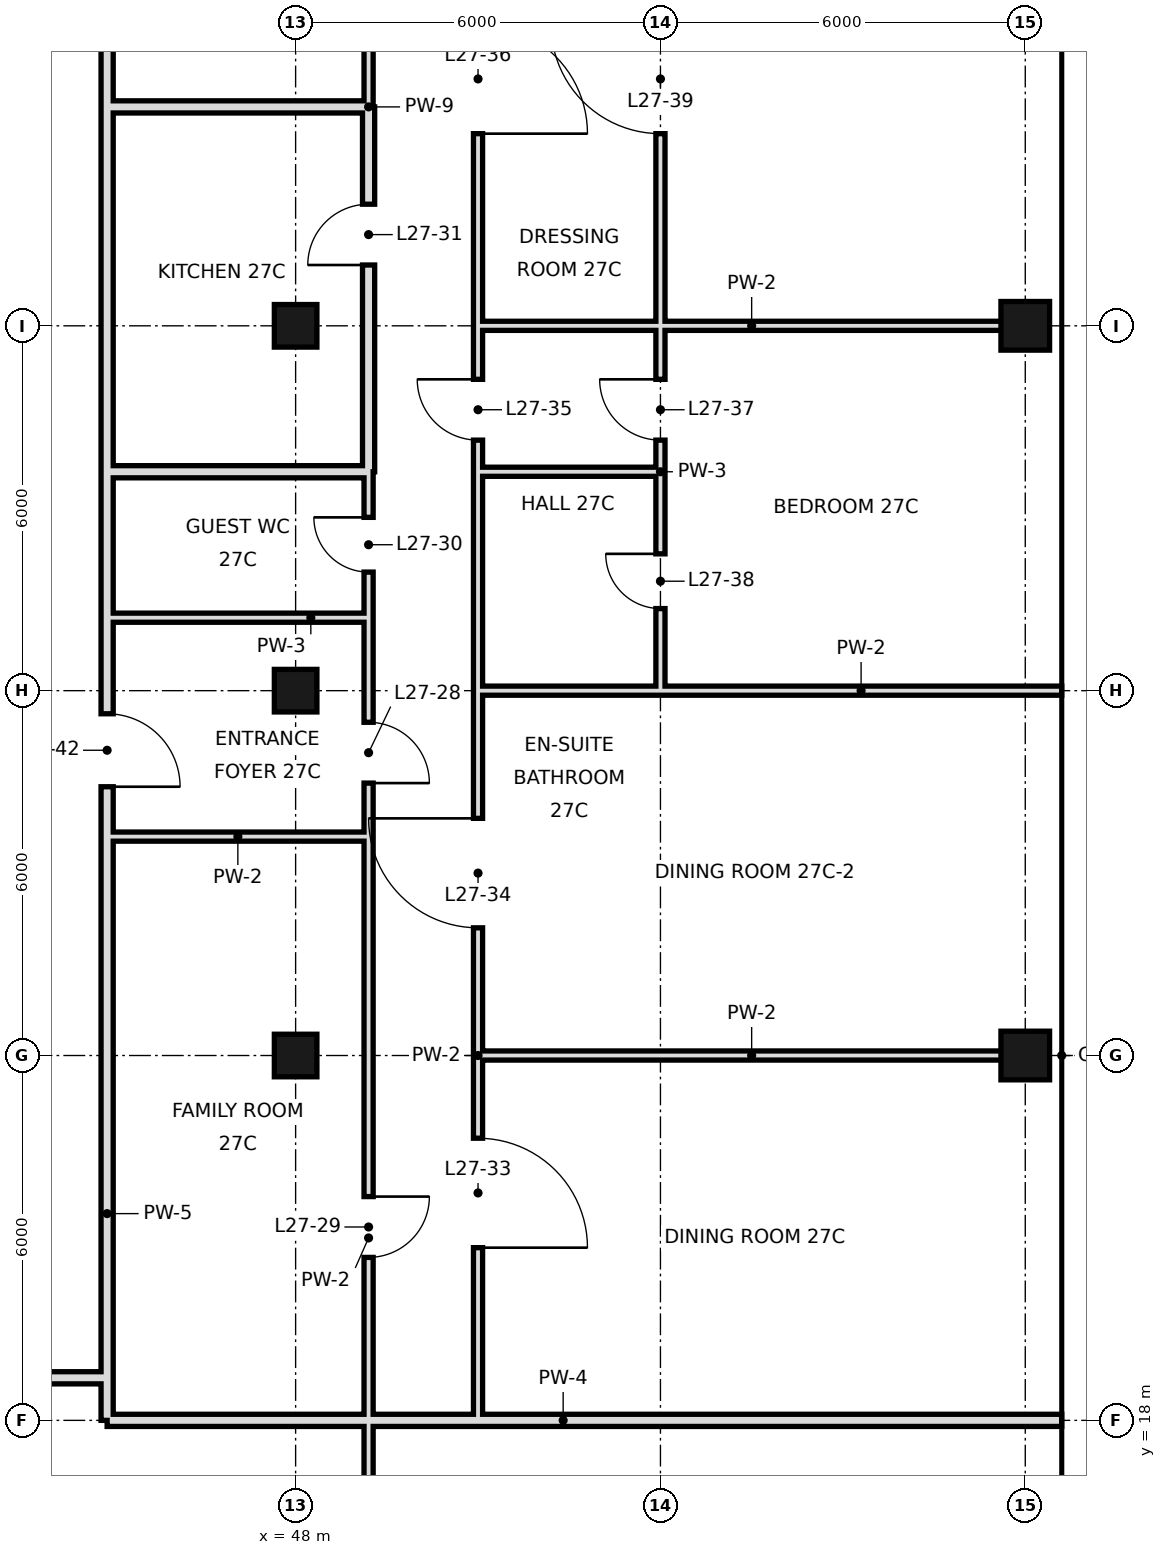
"""IFC4 building model, lengths in metres.
Left out: names, types, materials, properties, quantities, classifications, styles, units other than length and angle.
Written with IfcOpenShell. Run it as: python <this file> out.ifc"""

import sys

from ifc_helpers import new_model, si_unit, direction, frame, frame_2d, origin, origin_2d, place, context, subcontext, project, spatial, rectangle, hollow_rectangle, extrude, element, fill, save


model = new_model("IFC4")
c1 = context("Model", 3, precision=1e-05, world=origin(), true_north=direction((0.0, 1.0)))
c2 = subcontext(c1, "Body", "Model", "MODEL_VIEW")
j1 = project(units=[si_unit("LENGTHUNIT", "METRE"), si_unit("PLANEANGLEUNIT", "RADIAN")], contexts=[c1])
p1 = place(None, origin())
s1 = spatial("IfcSite", under=j1, at=p1, CompositionType="ELEMENT")
p2 = place(p1, origin())
s2 = spatial("IfcBuilding", under=s1, at=p2, CompositionType="ELEMENT")
p3 = place(p2, frame((0.0, 0.0, 123.2)))
s3 = spatial("IfcBuildingStorey", under=s2, at=p3, CompositionType="ELEMENT", Elevation=123.2)
for number, where, z_axis, x_axis in (
    (1, (48.0, 24.0, 0.0), (0.0, 0.0, 1.0), (1.0, 0.0, 0.0)),
    (2, (48.0, 30.0, 0.0), (0.0, 0.0, 1.0), (1.0, 0.0, 0.0)),
    (3, (48.0, 36.0, 0.0), (0.0, 0.0, 1.0), (1.0, 0.0, 0.0)),
):
    element("IfcColumn", number, at=place(p3, frame(where, z_axis=z_axis, x_axis=x_axis)), inside=s3, PredefinedType="COLUMN", context=c2, shape_type="SweptSolid", body=[
        extrude(hollow_rectangle(XDim=0.7, YDim=0.7, WallThickness=0.036, at=origin_2d()), origin(), (0.0, 0.0, 1.0), 3.6),
    ])
for number, where, z_axis, x_axis in (
    (4, (60.0, 24.0, 0.0), (0.0, 0.0, 1.0), (1.0, 0.0, 0.0)),
    (5, (60.0, 36.0, 0.0), (0.0, 0.0, 1.0), (1.0, 0.0, 0.0)),
):
    element("IfcColumn", number, at=place(p3, frame(where, z_axis=z_axis, x_axis=x_axis)), inside=s3, PredefinedType="COLUMN", context=c2, shape_type="SweptSolid", body=[
        extrude(hollow_rectangle(XDim=0.8, YDim=0.8, WallThickness=0.04, at=origin_2d()), origin(), (0.0, 0.0, 1.0), 3.6),
    ])
p4 = place(p3, frame((44.9, 18.7, 0.0), z_axis=(0.0, 0.0, 1.0), x_axis=(0.0, 1.0, 0.0)))
e6 = element("IfcWall", 6, at=p4, inside=s3, PredefinedType="SOLIDWALL", context=c2, shape_type="SweptSolid", body=[
    extrude(rectangle(XDim=14.9, YDim=0.2, at=frame_2d((7.45, 0.0))), origin(), (0.0, 0.0, 1.0), 2.97),
])
p5 = place(p4, frame((9.72, 0.0, 0.0)))
e7 = element("IfcOpeningElement", 7, at=p5, cuts=e6, PredefinedType="OPENING", context=c2, shape_type="SweptSolid", body=[
    extrude(rectangle(XDim=1.2, YDim=2.4, at=frame_2d((0.6, 1.2))), frame((0.0, 0.11, 0.0), z_axis=(0.0, -1.0, 0.0), x_axis=(1.0, 0.0, 0.0)), (0.0, 0.0, 1.0), 0.22),
])
p6 = place(p3, frame((44.9, 39.6, 0.0), z_axis=(0.0, 0.0, 1.0), x_axis=(0.0, 1.0, 0.0)))
e8 = element("IfcWall", 8, at=p6, inside=s3, PredefinedType="SOLIDWALL", context=c2, shape_type="SweptSolid", body=[
    extrude(rectangle(XDim=9.0, YDim=0.2, at=frame_2d((4.5, 0.0))), origin(), (0.0, 0.0, 1.0), 2.72),
])
p7 = place(p3, frame((44.9, 33.6, 0.0), z_axis=(0.0, 0.0, 1.0), x_axis=(0.0, 1.0, 0.0)))
e9 = element("IfcWall", 9, at=p7, inside=s3, PredefinedType="SOLIDWALL", context=c2, shape_type="SweptSolid", body=[
    extrude(rectangle(XDim=6.0, YDim=0.2, at=frame_2d((3.0, 0.0))), origin(), (0.0, 0.0, 1.0), 3.42),
])
p8 = place(p3, frame((44.9, 18.0, 0.0), z_axis=(0.0, 0.0, 1.0), x_axis=(0.0, 1.0, 0.0)))
e10 = element("IfcWall", 10, at=p8, inside=s3, PredefinedType="SOLIDWALL", context=c2, shape_type="SweptSolid", body=[
    extrude(rectangle(XDim=0.7, YDim=0.2, at=frame_2d((0.35, 0.0))), origin(), (0.0, 0.0, 1.0), 2.97),
])
p9 = place(p3, frame((49.2, 33.6, 0.0), z_axis=(0.0, 0.0, 1.0), x_axis=(0.0, 1.0, 0.0)))
e11 = element("IfcWall", 11, at=p9, inside=s3, PredefinedType="SOLIDWALL", context=c2, shape_type="SweptSolid", body=[
    extrude(rectangle(XDim=6.0, YDim=0.2, at=frame_2d((3.0, 0.0))), origin(), (0.0, 0.0, 1.0), 2.72),
])
p10 = place(p9, frame((3.4, 0.0, 0.0)))
e12 = element("IfcOpeningElement", 12, at=p10, cuts=e11, PredefinedType="OPENING", context=c2, shape_type="SweptSolid", body=[
    extrude(rectangle(XDim=1.0, YDim=2.4, at=frame_2d((0.5, 1.2))), frame((0.0, 0.11, 0.0), z_axis=(0.0, -1.0, 0.0), x_axis=(1.0, 0.0, 0.0)), (0.0, 0.0, 1.0), 0.22),
])
p11 = place(p3, frame((49.2, 10.8, 0.0), z_axis=(0.0, 0.0, 1.0), x_axis=(0.0, 1.0, 0.0)))
e13 = element("IfcWall", 13, at=p11, inside=s3, PredefinedType="PARTITIONING", context=c2, shape_type="SweptSolid", body=[
    extrude(rectangle(XDim=20.4, YDim=0.15, at=frame_2d((10.2, 0.0))), origin(), (0.0, 0.0, 1.0), 3.42),
])
p12 = place(p11, frame((17.68, 0.0, 0.0)))
e14 = element("IfcOpeningElement", 14, at=p12, cuts=e13, PredefinedType="OPENING", context=c2, shape_type="SweptSolid", body=[
    extrude(rectangle(XDim=1.0, YDim=2.4, at=frame_2d((0.5, 1.2))), frame((0.0, 0.085, 0.0), z_axis=(0.0, -1.0, 0.0), x_axis=(1.0, 0.0, 0.0)), (0.0, 0.0, 1.0), 0.17),
])
p13 = place(p11, frame((9.88, 0.0, 0.0)))
e15 = element("IfcOpeningElement", 15, at=p13, cuts=e13, PredefinedType="OPENING", context=c2, shape_type="SweptSolid", body=[
    extrude(rectangle(XDim=1.0, YDim=2.4, at=frame_2d((0.5, 1.2))), frame((0.0, 0.085, 0.0), z_axis=(0.0, -1.0, 0.0), x_axis=(1.0, 0.0, 0.0)), (0.0, 0.0, 1.0), 0.17),
])
p14 = place(p3, frame((49.2, 39.6, 0.0), z_axis=(0.0, 0.0, 1.0), x_axis=(0.0, 1.0, 0.0)))
e16 = element("IfcWall", 16, at=p14, inside=s3, PredefinedType="PARTITIONING", context=c2, shape_type="SweptSolid", body=[
    extrude(rectangle(XDim=9.0, YDim=0.15, at=frame_2d((4.5, 0.0))), origin(), (0.0, 0.0, 1.0), 3.42),
])
p15 = place(p14, frame((3.7, 0.0, 0.0)))
e17 = element("IfcOpeningElement", 17, at=p15, cuts=e16, PredefinedType="OPENING", context=c2, shape_type="SweptSolid", body=[
    extrude(rectangle(XDim=1.0, YDim=2.4, at=frame_2d((0.5, 1.2))), frame((0.0, 0.085, 0.0), z_axis=(0.0, -1.0, 0.0), x_axis=(1.0, 0.0, 0.0)), (0.0, 0.0, 1.0), 0.17),
])
p16 = place(p3, frame((49.2, 31.2, 0.0), z_axis=(0.0, 0.0, 1.0), x_axis=(0.0, 1.0, 0.0)))
e18 = element("IfcWall", 18, at=p16, inside=s3, PredefinedType="PARTITIONING", context=c2, shape_type="SweptSolid", body=[
    extrude(rectangle(XDim=2.4, YDim=0.15, at=frame_2d((1.2, 0.0))), origin(), (0.0, 0.0, 1.0), 3.42),
])
p17 = place(p16, frame((0.75, 0.0, 0.0)))
e19 = element("IfcOpeningElement", 19, at=p17, cuts=e18, PredefinedType="OPENING", context=c2, shape_type="SweptSolid", body=[
    extrude(rectangle(XDim=0.9, YDim=2.4, at=frame_2d((0.45, 1.2))), frame((0.0, 0.085, 0.0), z_axis=(0.0, -1.0, 0.0), x_axis=(1.0, 0.0, 0.0)), (0.0, 0.0, 1.0), 0.17),
])
p18 = place(p3, frame((51.0, 18.0, 0.0), z_axis=(0.0, 0.0, 1.0), x_axis=(0.0, 1.0, 0.0)))
e20 = element("IfcWall", 20, at=p18, inside=s3, PredefinedType="PARTITIONING", context=c2, shape_type="SweptSolid", body=[
    extrude(rectangle(XDim=12.0, YDim=0.15, at=frame_2d((6.0, 0.0))), origin(), (0.0, 0.0, 1.0), 3.42),
])
p19 = place(p18, frame((2.84, 0.0, 0.0)))
e21 = element("IfcOpeningElement", 21, at=p19, cuts=e20, PredefinedType="OPENING", context=c2, shape_type="SweptSolid", body=[
    extrude(rectangle(XDim=1.8, YDim=2.4, at=frame_2d((0.9, 1.2))), frame((0.0, 0.085, 0.0), z_axis=(0.0, -1.0, 0.0), x_axis=(1.0, 0.0, 0.0)), (0.0, 0.0, 1.0), 0.17),
])
p20 = place(p18, frame((8.1, 0.0, 0.0)))
e22 = element("IfcOpeningElement", 22, at=p20, cuts=e20, PredefinedType="OPENING", context=c2, shape_type="SweptSolid", body=[
    extrude(rectangle(XDim=1.8, YDim=2.4, at=frame_2d((0.9, 1.2))), frame((0.0, 0.085, 0.0), z_axis=(0.0, -1.0, 0.0), x_axis=(1.0, 0.0, 0.0)), (0.0, 0.0, 1.0), 0.17),
])
p21 = place(p3, frame((51.0, 33.6, 0.0), z_axis=(0.0, 0.0, 1.0), x_axis=(0.0, 1.0, 0.0)))
e23 = element("IfcWall", 23, at=p21, inside=s3, PredefinedType="PARTITIONING", context=c2, shape_type="SweptSolid", body=[
    extrude(rectangle(XDim=15.0, YDim=0.15, at=frame_2d((7.5, 0.0))), origin(), (0.0, 0.0, 1.0), 3.42),
])
p22 = place(p21, frame((0.52, 0.0, 0.0)))
e24 = element("IfcOpeningElement", 24, at=p22, cuts=e23, PredefinedType="OPENING", context=c2, shape_type="SweptSolid", body=[
    extrude(rectangle(XDim=1.0, YDim=2.4, at=frame_2d((0.5, 1.2))), frame((0.0, 0.085, 0.0), z_axis=(0.0, -1.0, 0.0), x_axis=(1.0, 0.0, 0.0)), (0.0, 0.0, 1.0), 0.17),
])
p23 = place(p21, frame((5.56, 0.0, 0.0)))
e25 = element("IfcOpeningElement", 25, at=p23, cuts=e23, PredefinedType="OPENING", context=c2, shape_type="SweptSolid", body=[
    extrude(rectangle(XDim=1.8, YDim=2.4, at=frame_2d((0.9, 1.2))), frame((0.0, 0.085, 0.0), z_axis=(0.0, -1.0, 0.0), x_axis=(1.0, 0.0, 0.0)), (0.0, 0.0, 1.0), 0.17),
])
p24 = place(p3, frame((51.0, 30.0, 0.0), z_axis=(0.0, 0.0, 1.0), x_axis=(0.0, 1.0, 0.0)))
e26 = element("IfcWall", 26, at=p24, inside=s3, PredefinedType="PARTITIONING", context=c2, shape_type="SweptSolid", body=[
    extrude(rectangle(XDim=3.6, YDim=0.15, at=frame_2d((1.8, 0.0))), origin(), (0.0, 0.0, 1.0), 3.42),
])
p25 = place(p3, frame((54.0, 33.6, 0.0), z_axis=(0.0, 0.0, 1.0), x_axis=(0.0, 1.0, 0.0)))
e27 = element("IfcWall", 27, at=p25, inside=s3, PredefinedType="PARTITIONING", context=c2, shape_type="SweptSolid", body=[
    extrude(rectangle(XDim=14.4, YDim=0.15, at=frame_2d((7.2, 0.0))), origin(), (0.0, 0.0, 1.0), 3.42),
])
p26 = place(p25, frame((0.52, 0.0, 0.0)))
e28 = element("IfcOpeningElement", 28, at=p26, cuts=e27, PredefinedType="OPENING", context=c2, shape_type="SweptSolid", body=[
    extrude(rectangle(XDim=1.0, YDim=2.4, at=frame_2d((0.5, 1.2))), frame((0.0, 0.085, 0.0), z_axis=(0.0, -1.0, 0.0), x_axis=(1.0, 0.0, 0.0)), (0.0, 0.0, 1.0), 0.17),
])
p27 = place(p25, frame((5.56, 0.0, 0.0)))
e29 = element("IfcOpeningElement", 29, at=p27, cuts=e27, PredefinedType="OPENING", context=c2, shape_type="SweptSolid", body=[
    extrude(rectangle(XDim=1.8, YDim=2.4, at=frame_2d((0.9, 1.2))), frame((0.0, 0.085, 0.0), z_axis=(0.0, -1.0, 0.0), x_axis=(1.0, 0.0, 0.0)), (0.0, 0.0, 1.0), 0.17),
])
p28 = place(p3, frame((54.0, 30.0, 0.0), z_axis=(0.0, 0.0, 1.0), x_axis=(0.0, 1.0, 0.0)))
e30 = element("IfcWall", 30, at=p28, inside=s3, PredefinedType="PARTITIONING", context=c2, shape_type="SweptSolid", body=[
    extrude(rectangle(XDim=3.6, YDim=0.15, at=frame_2d((1.8, 0.0))), origin(), (0.0, 0.0, 1.0), 3.42),
])
p29 = place(p28, frame((1.35, 0.0, 0.0)))
e31 = element("IfcOpeningElement", 31, at=p29, cuts=e30, PredefinedType="OPENING", context=c2, shape_type="SweptSolid", body=[
    extrude(rectangle(XDim=0.9, YDim=2.4, at=frame_2d((0.45, 1.2))), frame((0.0, 0.085, 0.0), z_axis=(0.0, -1.0, 0.0), x_axis=(1.0, 0.0, 0.0)), (0.0, 0.0, 1.0), 0.17),
])
p30 = place(p3, frame((44.9, 18.0, 0.0), z_axis=(0.0, 0.0, 1.0), x_axis=(1.0, 0.0, 0.0)))
e32 = element("IfcWall", 32, at=p30, inside=s3, PredefinedType="SOLIDWALL", context=c2, shape_type="SweptSolid", body=[
    extrude(rectangle(XDim=15.7, YDim=0.2, at=frame_2d((7.85, 0.0))), origin(), (0.0, 0.0, 1.0), 2.72),
])
p31 = place(p3, frame((35.4, 18.7, 0.0), z_axis=(0.0, 0.0, 1.0), x_axis=(1.0, 0.0, 0.0)))
e33 = element("IfcWall", 33, at=p31, inside=s3, PredefinedType="SOLIDWALL", context=c2, shape_type="SweptSolid", body=[
    extrude(rectangle(XDim=9.5, YDim=0.2, at=frame_2d((4.75, 0.0))), origin(), (0.0, 0.0, 1.0), 2.72),
])
p32 = place(p3, frame((51.0, 24.0, 0.0), z_axis=(0.0, 0.0, 1.0), x_axis=(1.0, 0.0, 0.0)))
e34 = element("IfcWall", 34, at=p32, inside=s3, PredefinedType="PARTITIONING", context=c2, shape_type="SweptSolid", body=[
    extrude(rectangle(XDim=9.0, YDim=0.15, at=frame_2d((4.5, 0.0))), origin(), (0.0, 0.0, 1.0), 2.72),
])
p33 = place(p3, frame((44.9, 27.6, 0.0), z_axis=(0.0, 0.0, 1.0), x_axis=(1.0, 0.0, 0.0)))
e35 = element("IfcWall", 35, at=p33, inside=s3, PredefinedType="PARTITIONING", context=c2, shape_type="SweptSolid", body=[
    extrude(rectangle(XDim=4.3, YDim=0.15, at=frame_2d((2.15, 0.0))), origin(), (0.0, 0.0, 1.0), 3.42),
])
p34 = place(p3, frame((54.0, 30.0, 0.0), z_axis=(0.0, 0.0, 1.0), x_axis=(1.0, 0.0, 0.0)))
e36 = element("IfcWall", 36, at=p34, inside=s3, PredefinedType="PARTITIONING", context=c2, shape_type="SweptSolid", body=[
    extrude(rectangle(XDim=6.6, YDim=0.15, at=frame_2d((3.3, 0.0))), origin(), (0.0, 0.0, 1.0), 2.72),
])
p35 = place(p3, frame((51.0, 30.0, 0.0), z_axis=(0.0, 0.0, 1.0), x_axis=(1.0, 0.0, 0.0)))
e37 = element("IfcWall", 37, at=p35, inside=s3, PredefinedType="PARTITIONING", context=c2, shape_type="SweptSolid", body=[
    extrude(rectangle(XDim=3.0, YDim=0.15, at=frame_2d((1.5, 0.0))), origin(), (0.0, 0.0, 1.0), 2.72),
])
p36 = place(p3, frame((44.9, 31.2, 0.0), z_axis=(0.0, 0.0, 1.0), x_axis=(1.0, 0.0, 0.0)))
e38 = element("IfcWall", 38, at=p36, inside=s3, PredefinedType="PARTITIONING", context=c2, shape_type="SweptSolid", body=[
    extrude(rectangle(XDim=4.3, YDim=0.15, at=frame_2d((2.15, 0.0))), origin(), (0.0, 0.0, 1.0), 3.42),
])
p37 = place(p3, frame((44.9, 33.6, 0.0), z_axis=(0.0, 0.0, 1.0), x_axis=(1.0, 0.0, 0.0)))
e39 = element("IfcWall", 39, at=p37, inside=s3, PredefinedType="SOLIDWALL", context=c2, shape_type="SweptSolid", body=[
    extrude(rectangle(XDim=4.3, YDim=0.2, at=frame_2d((2.15, 0.0))), origin(), (0.0, 0.0, 1.0), 2.97),
])
p38 = place(p3, frame((51.0, 33.6, 0.0), z_axis=(0.0, 0.0, 1.0), x_axis=(1.0, 0.0, 0.0)))
e40 = element("IfcWall", 40, at=p38, inside=s3, PredefinedType="PARTITIONING", context=c2, shape_type="SweptSolid", body=[
    extrude(rectangle(XDim=3.0, YDim=0.15, at=frame_2d((1.5, 0.0))), origin(), (0.0, 0.0, 1.0), 3.42),
])
p39 = place(p3, frame((51.0, 36.0, 0.0), z_axis=(0.0, 0.0, 1.0), x_axis=(1.0, 0.0, 0.0)))
e41 = element("IfcWall", 41, at=p39, inside=s3, PredefinedType="PARTITIONING", context=c2, shape_type="SweptSolid", body=[
    extrude(rectangle(XDim=9.0, YDim=0.15, at=frame_2d((4.5, 0.0))), origin(), (0.0, 0.0, 1.0), 2.72),
])
p40 = place(p3, frame((44.9, 39.6, 0.0), z_axis=(0.0, 0.0, 1.0), x_axis=(1.0, 0.0, 0.0)))
e42 = element("IfcWall", 42, at=p40, inside=s3, PredefinedType="SOLIDWALL", context=c2, shape_type="SweptSolid", body=[
    extrude(rectangle(XDim=4.3, YDim=0.2, at=frame_2d((2.15, 0.0))), origin(), (0.0, 0.0, 1.0), 2.97),
])
p41 = place(p12, frame((1.0, 0.0, 0.0), z_axis=(0.0, 0.0, 1.0), x_axis=(-1.0, 0.0, 0.0)))
e43 = element("IfcDoor", 43, at=p41, inside=s3, OperationType="SINGLE_SWING_RIGHT", PredefinedType="DOOR", context=c2, shape_type="SweptSolid", body=[
    extrude(rectangle(XDim=1.0, YDim=2.4, at=frame_2d((0.5, 1.2))), frame((0.0, 0.025, 0.0), z_axis=(0.0, -1.0, 0.0), x_axis=(1.0, 0.0, 0.0)), (0.0, 0.0, 1.0), 0.05),
])
fill(e14, e43)
p42 = place(p13, origin())
e44 = element("IfcDoor", 44, at=p42, inside=s3, OperationType="SINGLE_SWING_RIGHT", PredefinedType="DOOR", context=c2, shape_type="SweptSolid", body=[
    extrude(rectangle(XDim=1.0, YDim=2.4, at=frame_2d((0.5, 1.2))), frame((0.0, 0.025, 0.0), z_axis=(0.0, -1.0, 0.0), x_axis=(1.0, 0.0, 0.0)), (0.0, 0.0, 1.0), 0.05),
])
fill(e15, e44)
p43 = place(p17, frame((0.9, 0.0, 0.0), z_axis=(0.0, 0.0, 1.0), x_axis=(-1.0, 0.0, 0.0)))
e45 = element("IfcDoor", 45, at=p43, inside=s3, OperationType="SINGLE_SWING_LEFT", PredefinedType="DOOR", context=c2, shape_type="SweptSolid", body=[
    extrude(rectangle(XDim=0.9, YDim=2.4, at=frame_2d((0.45, 1.2))), frame((0.0, 0.025, 0.0), z_axis=(0.0, -1.0, 0.0), x_axis=(1.0, 0.0, 0.0)), (0.0, 0.0, 1.0), 0.05),
])
fill(e19, e45)
p44 = place(p10, origin())
e46 = element("IfcDoor", 46, at=p44, inside=s3, OperationType="SINGLE_SWING_LEFT", PredefinedType="DOOR", context=c2, shape_type="SweptSolid", body=[
    extrude(rectangle(XDim=1.0, YDim=2.4, at=frame_2d((0.5, 1.2))), frame((0.0, 0.025, 0.0), z_axis=(0.0, -1.0, 0.0), x_axis=(1.0, 0.0, 0.0)), (0.0, 0.0, 1.0), 0.05),
])
fill(e12, e46)
p45 = place(p19, frame((1.8, 0.0, 0.0), z_axis=(0.0, 0.0, 1.0), x_axis=(-1.0, 0.0, 0.0)))
e47 = element("IfcDoor", 47, at=p45, inside=s3, OperationType="SINGLE_SWING_RIGHT", PredefinedType="DOOR", context=c2, shape_type="SweptSolid", body=[
    extrude(rectangle(XDim=1.8, YDim=2.4, at=frame_2d((0.9, 1.2))), frame((0.0, 0.025, 0.0), z_axis=(0.0, -1.0, 0.0), x_axis=(1.0, 0.0, 0.0)), (0.0, 0.0, 1.0), 0.05),
])
fill(e21, e47)
p46 = place(p20, frame((1.8, 0.0, 0.0), z_axis=(0.0, 0.0, 1.0), x_axis=(-1.0, 0.0, 0.0)))
e48 = element("IfcDoor", 48, at=p46, inside=s3, OperationType="SINGLE_SWING_LEFT", PredefinedType="DOOR", context=c2, shape_type="SweptSolid", body=[
    extrude(rectangle(XDim=1.8, YDim=2.4, at=frame_2d((0.9, 1.2))), frame((0.0, 0.025, 0.0), z_axis=(0.0, -1.0, 0.0), x_axis=(1.0, 0.0, 0.0)), (0.0, 0.0, 1.0), 0.05),
])
fill(e22, e48)
p47 = place(p22, frame((1.0, 0.0, 0.0), z_axis=(0.0, 0.0, 1.0), x_axis=(-1.0, 0.0, 0.0)))
e49 = element("IfcDoor", 49, at=p47, inside=s3, OperationType="SINGLE_SWING_LEFT", PredefinedType="DOOR", context=c2, shape_type="SweptSolid", body=[
    extrude(rectangle(XDim=1.0, YDim=2.4, at=frame_2d((0.5, 1.2))), frame((0.0, 0.025, 0.0), z_axis=(0.0, -1.0, 0.0), x_axis=(1.0, 0.0, 0.0)), (0.0, 0.0, 1.0), 0.05),
])
fill(e24, e49)
p48 = place(p23, frame((1.8, 0.0, 0.0), z_axis=(0.0, 0.0, 1.0), x_axis=(-1.0, 0.0, 0.0)))
e50 = element("IfcDoor", 50, at=p48, inside=s3, OperationType="SINGLE_SWING_RIGHT", PredefinedType="DOOR", context=c2, shape_type="SweptSolid", body=[
    extrude(rectangle(XDim=1.8, YDim=2.4, at=frame_2d((0.9, 1.2))), frame((0.0, 0.025, 0.0), z_axis=(0.0, -1.0, 0.0), x_axis=(1.0, 0.0, 0.0)), (0.0, 0.0, 1.0), 0.05),
])
fill(e25, e50)
p49 = place(p26, frame((1.0, 0.0, 0.0), z_axis=(0.0, 0.0, 1.0), x_axis=(-1.0, 0.0, 0.0)))
e51 = element("IfcDoor", 51, at=p49, inside=s3, OperationType="SINGLE_SWING_LEFT", PredefinedType="DOOR", context=c2, shape_type="SweptSolid", body=[
    extrude(rectangle(XDim=1.0, YDim=2.4, at=frame_2d((0.5, 1.2))), frame((0.0, 0.025, 0.0), z_axis=(0.0, -1.0, 0.0), x_axis=(1.0, 0.0, 0.0)), (0.0, 0.0, 1.0), 0.05),
])
fill(e28, e51)
p50 = place(p29, frame((0.9, 0.0, 0.0), z_axis=(0.0, 0.0, 1.0), x_axis=(-1.0, 0.0, 0.0)))
e52 = element("IfcDoor", 52, at=p50, inside=s3, OperationType="SINGLE_SWING_LEFT", PredefinedType="DOOR", context=c2, shape_type="SweptSolid", body=[
    extrude(rectangle(XDim=0.9, YDim=2.4, at=frame_2d((0.45, 1.2))), frame((0.0, 0.025, 0.0), z_axis=(0.0, -1.0, 0.0), x_axis=(1.0, 0.0, 0.0)), (0.0, 0.0, 1.0), 0.05),
])
fill(e31, e52)
p51 = place(p27, frame((1.8, 0.0, 0.0), z_axis=(0.0, 0.0, 1.0), x_axis=(-1.0, 0.0, 0.0)))
e53 = element("IfcDoor", 53, at=p51, inside=s3, OperationType="SINGLE_SWING_LEFT", PredefinedType="DOOR", context=c2, shape_type="SweptSolid", body=[
    extrude(rectangle(XDim=1.8, YDim=2.4, at=frame_2d((0.9, 1.2))), frame((0.0, 0.025, 0.0), z_axis=(0.0, -1.0, 0.0), x_axis=(1.0, 0.0, 0.0)), (0.0, 0.0, 1.0), 0.05),
])
fill(e29, e53)
p52 = place(p5, frame((1.2, 0.0, 0.0), z_axis=(0.0, 0.0, 1.0), x_axis=(-1.0, 0.0, 0.0)))
e54 = element("IfcDoor", 54, at=p52, inside=s3, OperationType="SINGLE_SWING_RIGHT", PredefinedType="DOOR", context=c2, shape_type="SweptSolid", body=[
    extrude(rectangle(XDim=1.2, YDim=2.4, at=frame_2d((0.6, 1.2))), frame((0.0, 0.025, 0.0), z_axis=(0.0, -1.0, 0.0), x_axis=(1.0, 0.0, 0.0)), (0.0, 0.0, 1.0), 0.05),
])
fill(e7, e54)
save(model, sys.argv[1])
